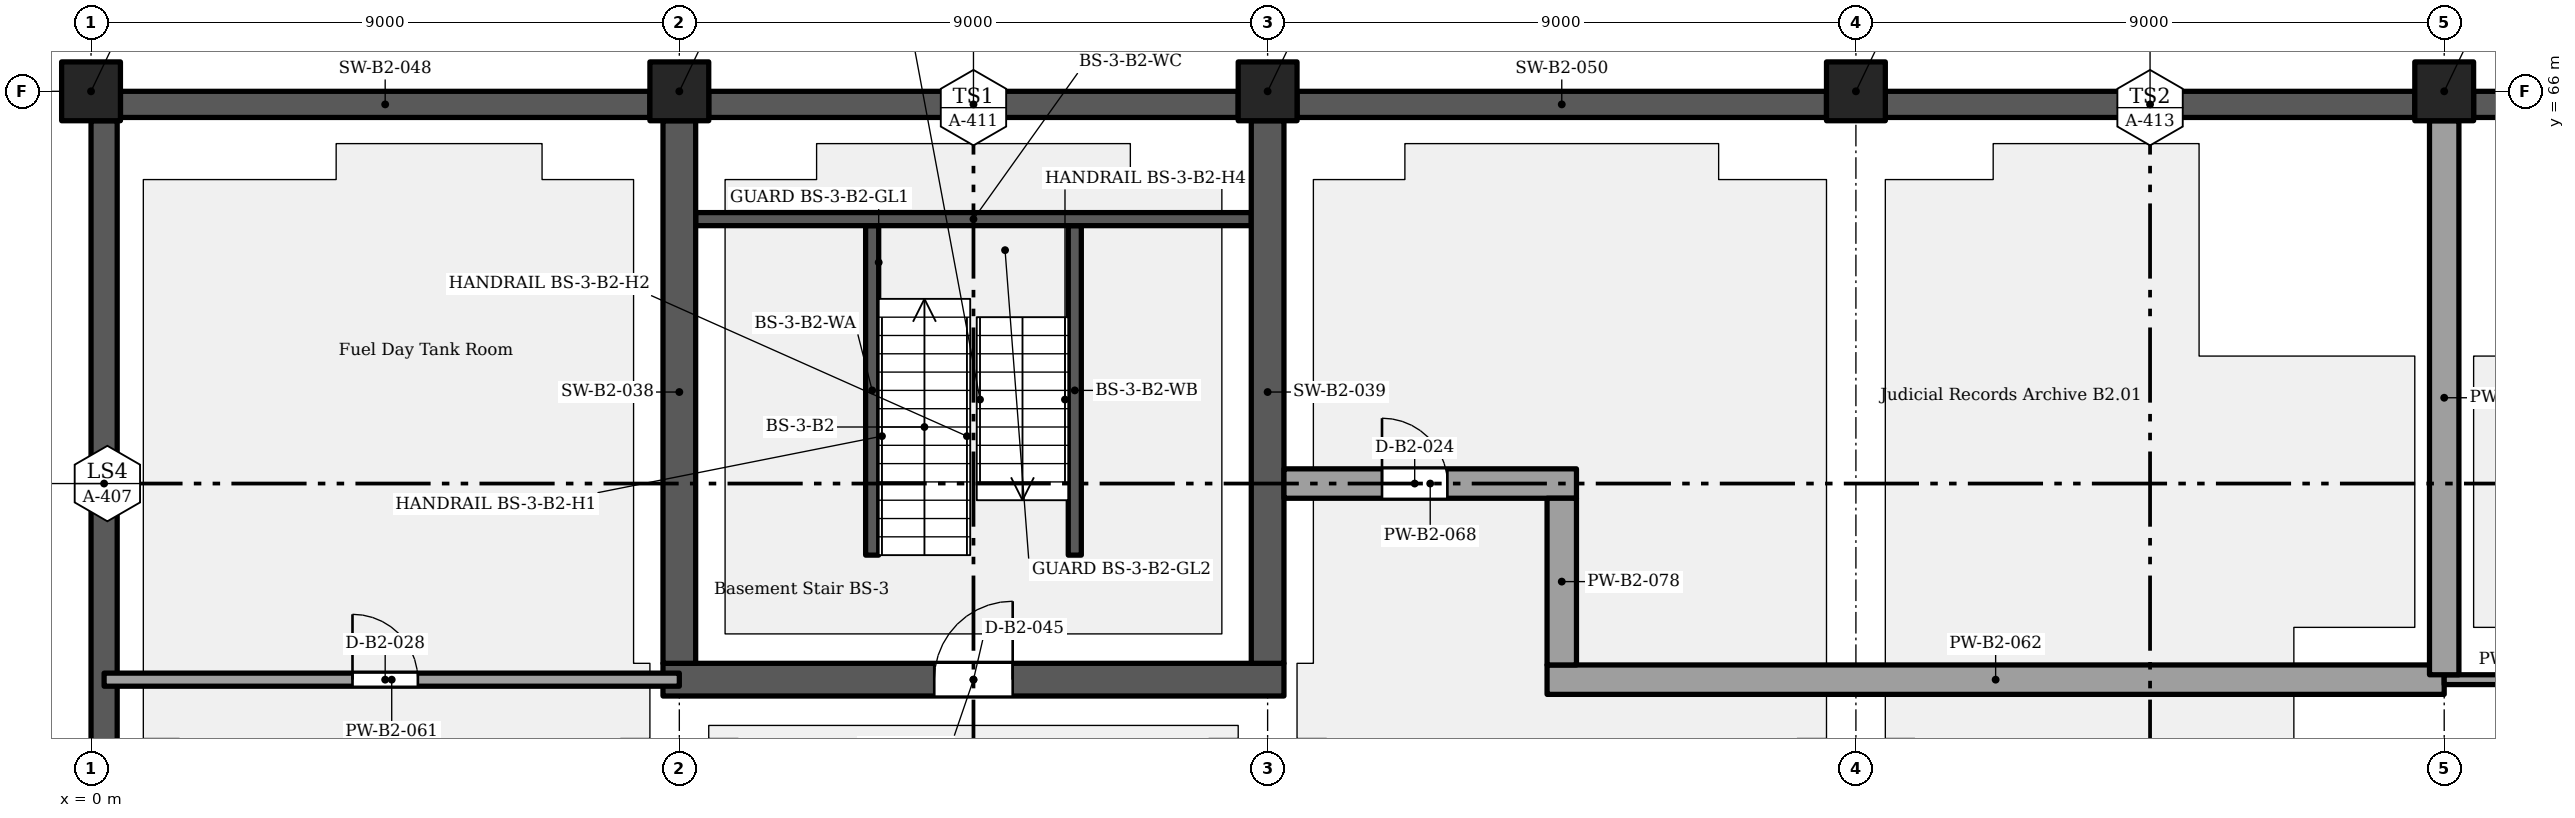
"""IFC4 building model, lengths in metres.
Left out: names, types, materials, properties, quantities, classifications, styles, units other than length and angle.
Written with IfcOpenShell. Run it as: python <this file> out.ifc"""

import sys

from ifc_helpers import new_model, si_unit, direction, frame, frame_2d, origin, origin_2d, place, context, subcontext, project, spatial, rectangle, extrude, element, fill, save


model = new_model("IFC4")
c1 = context("Model", 3, precision=1e-05, world=origin(), true_north=direction((0.0, 1.0)))
c2 = subcontext(c1, "Body", "Model", "MODEL_VIEW")
j1 = project(units=[si_unit("LENGTHUNIT", "METRE"), si_unit("PLANEANGLEUNIT", "RADIAN")], contexts=[c1])
p1 = place(None, origin())
s1 = spatial("IfcSite", under=j1, at=p1, CompositionType="ELEMENT")
p2 = place(p1, origin())
s2 = spatial("IfcBuilding", under=s1, at=p2, CompositionType="ELEMENT")
p3 = place(p2, frame((0.0, 0.0, -8.4)))
s3 = spatial("IfcBuildingStorey", under=s2, at=p3, CompositionType="ELEMENT", Elevation=-8.4)
for number, where, z_axis, x_axis in (
    (1, (0.0, 66.0, 0.0), (0.0, 0.0, 1.0), (1.0, 0.0, 0.0)),
    (2, (9.0, 66.0, 0.0), (0.0, 0.0, 1.0), (1.0, 0.0, 0.0)),
    (3, (18.0, 66.0, 0.0), (0.0, 0.0, 1.0), (1.0, 0.0, 0.0)),
    (4, (27.0, 66.0, 0.0), (0.0, 0.0, 1.0), (1.0, 0.0, 0.0)),
    (5, (36.0, 66.0, 0.0), (0.0, 0.0, 1.0), (1.0, 0.0, 0.0)),
):
    element("IfcColumn", number, at=place(p3, frame(where, z_axis=z_axis, x_axis=x_axis)), inside=s3, PredefinedType="COLUMN", context=c2, shape_type="SweptSolid", body=[
        extrude(rectangle(XDim=0.9, YDim=0.9, at=origin_2d()), origin(), (0.0, 0.0, 1.0), 4.2),
    ])
p4 = place(p3, frame((0.2, 54.45, 0.0), z_axis=(0.0, 0.0, 1.0), x_axis=(0.0, 1.0, 0.0)))
e6 = element("IfcWall", 6, at=p4, inside=s3, PredefinedType="SOLIDWALL", context=c2, shape_type="SweptSolid", body=[
    extrude(rectangle(XDim=11.1, YDim=0.4, at=frame_2d((5.55, 0.0))), origin(), (0.0, 0.0, 1.0), 3.8),
])
p5 = place(p3, frame((8.75, 57.0, 0.0), z_axis=(0.0, 0.0, 1.0), x_axis=(1.0, 0.0, 0.0)))
e7 = element("IfcWall", 7, at=p5, inside=s3, PredefinedType="SHEAR", context=c2, shape_type="SweptSolid", body=[
    extrude(rectangle(XDim=9.5, YDim=0.5, at=frame_2d((4.75, 0.0))), origin(), (0.0, 0.0, 1.0), 3.8),
])
p6 = place(p5, frame((4.15, 0.0, 0.0)))
e8 = element("IfcOpeningElement", 8, at=p6, cuts=e7, PredefinedType="OPENING", context=c2, shape_type="SweptSolid", body=[
    extrude(rectangle(XDim=1.2, YDim=2.1, at=frame_2d((0.6, 1.05))), frame((0.0, 0.26, 0.0), z_axis=(0.0, -1.0, 0.0), x_axis=(1.0, 0.0, 0.0)), (0.0, 0.0, 1.0), 0.52),
])
for number, where, z_axis, x_axis in (
    (9, (9.0, 57.25, 0.0), (0.0, 0.0, 1.0), (0.0, 1.0, 0.0)),
    (10, (18.0, 57.25, 0.0), (0.0, 0.0, 1.0), (0.0, 1.0, 0.0)),
):
    element("IfcWall", number, at=place(p3, frame(where, z_axis=z_axis, x_axis=x_axis)), inside=s3, PredefinedType="SHEAR", context=c2, shape_type="SweptSolid", body=[
        extrude(rectangle(XDim=8.3, YDim=0.5, at=frame_2d((4.15, 0.0))), origin(), (0.0, 0.0, 1.0), 3.8),
    ])
for number, where, z_axis, x_axis in (
    (11, (0.45, 65.8, 0.0), (0.0, 0.0, 1.0), (1.0, 0.0, 0.0)),
    (12, (9.45, 65.8, 0.0), (0.0, 0.0, 1.0), (1.0, 0.0, 0.0)),
    (13, (18.45, 65.8, 0.0), (0.0, 0.0, 1.0), (1.0, 0.0, 0.0)),
    (14, (27.45, 65.8, 0.0), (0.0, 0.0, 1.0), (1.0, 0.0, 0.0)),
    (15, (36.45, 65.8, 0.0), (0.0, 0.0, 1.0), (1.0, 0.0, 0.0)),
):
    element("IfcWall", number, at=place(p3, frame(where, z_axis=z_axis, x_axis=x_axis)), inside=s3, PredefinedType="SOLIDWALL", context=c2, shape_type="SweptSolid", body=[
        extrude(rectangle(XDim=8.1, YDim=0.4, at=frame_2d((4.05, 0.0))), origin(), (0.0, 0.0, 1.0), 3.8),
    ])
p7 = place(p3, frame((0.2, 57.0, 0.0), z_axis=(0.0, 0.0, 1.0), x_axis=(1.0, 0.0, 0.0)))
e16 = element("IfcWall", 16, at=p7, inside=s3, PredefinedType="PARTITIONING", context=c2, shape_type="SweptSolid", body=[
    extrude(rectangle(XDim=8.8, YDim=0.2, at=frame_2d((4.4, 0.0))), origin(), (0.0, 0.0, 1.0), 3.8),
])
p8 = place(p7, frame((3.8, 0.0, 0.0)))
e17 = element("IfcOpeningElement", 17, at=p8, cuts=e16, PredefinedType="OPENING", context=c2, shape_type="SweptSolid", body=[
    extrude(rectangle(XDim=1.0, YDim=2.1, at=frame_2d((0.5, 1.05))), frame((0.0, 0.11, 0.0), z_axis=(0.0, -1.0, 0.0), x_axis=(1.0, 0.0, 0.0)), (0.0, 0.0, 1.0), 0.22),
])
p9 = place(p3, frame((22.275, 57.0, 0.0), z_axis=(0.0, 0.0, 1.0), x_axis=(1.0, 0.0, 0.0)))
e18 = element("IfcWall", 18, at=p9, inside=s3, PredefinedType="PARTITIONING", context=c2, shape_type="SweptSolid", body=[
    extrude(rectangle(XDim=13.725, YDim=0.45, at=frame_2d((6.863, 0.0))), origin(), (0.0, 0.0, 1.0), 3.8),
])
p10 = place(p3, frame((36.0, 57.0, 0.0), z_axis=(0.0, 0.0, 1.0), x_axis=(1.0, 0.0, 0.0)))
e19 = element("IfcWall", 19, at=p10, inside=s3, PredefinedType="PARTITIONING", context=c2, shape_type="SweptSolid", body=[
    extrude(rectangle(XDim=2.475, YDim=0.15, at=frame_2d((1.238, 0.0))), origin(), (0.0, 0.0, 1.0), 3.1),
])
p11 = place(p3, frame((18.25, 60.0, 0.0), z_axis=(0.0, 0.0, 1.0), x_axis=(1.0, 0.0, 0.0)))
e20 = element("IfcWall", 20, at=p11, inside=s3, PredefinedType="PARTITIONING", context=c2, shape_type="SweptSolid", body=[
    extrude(rectangle(XDim=4.475, YDim=0.45, at=frame_2d((2.238, 0.0))), origin(), (0.0, 0.0, 1.0), 3.3),
])
p12 = place(p11, frame((1.5, 0.0, 0.0)))
e21 = element("IfcOpeningElement", 21, at=p12, cuts=e20, PredefinedType="OPENING", context=c2, shape_type="SweptSolid", body=[
    extrude(rectangle(XDim=1.0, YDim=2.1, at=frame_2d((0.5, 1.05))), frame((0.0, 0.235, 0.0), z_axis=(0.0, -1.0, 0.0), x_axis=(1.0, 0.0, 0.0)), (0.0, 0.0, 1.0), 0.47),
])
p13 = place(p3, frame((22.5, 57.225, 0.0), z_axis=(0.0, 0.0, 1.0), x_axis=(0.0, 1.0, 0.0)))
e22 = element("IfcWall", 22, at=p13, inside=s3, PredefinedType="PARTITIONING", context=c2, shape_type="SweptSolid", body=[
    extrude(rectangle(XDim=2.55, YDim=0.45, at=frame_2d((1.275, 0.0))), origin(), (0.0, 0.0, 1.0), 3.05),
])
p14 = place(p3, frame((36.0, 57.075, 0.0), z_axis=(0.0, 0.0, 1.0), x_axis=(0.0, 1.0, 0.0)))
e23 = element("IfcWall", 23, at=p14, inside=s3, PredefinedType="PARTITIONING", context=c2, shape_type="SweptSolid", body=[
    extrude(rectangle(XDim=8.475, YDim=0.45, at=frame_2d((4.238, 0.0))), origin(), (0.0, 0.0, 1.0), 3.05),
])
for number, where, z_axis, x_axis in (
    (24, (11.95, 58.905, 0.0), (0.0, 0.0, 1.0), (0.0, 1.0, 0.0)),
    (25, (15.05, 58.905, 0.0), (0.0, 0.0, 1.0), (0.0, 1.0, 0.0)),
):
    element("IfcWall", number, at=place(p3, frame(where, z_axis=z_axis, x_axis=x_axis)), inside=s3, PredefinedType="SHEAR", context=c2, shape_type="SweptSolid", body=[
        extrude(rectangle(XDim=5.04, YDim=0.2, at=frame_2d((2.52, 0.0))), origin(), (0.0, 0.0, 1.0), 3.8),
    ])
p15 = place(p3, frame((9.25, 64.045, 0.0), z_axis=(0.0, 0.0, 1.0), x_axis=(1.0, 0.0, 0.0)))
e26 = element("IfcWall", 26, at=p15, inside=s3, PredefinedType="SHEAR", context=c2, shape_type="SweptSolid", body=[
    extrude(rectangle(XDim=8.5, YDim=0.2, at=frame_2d((4.25, 0.0))), origin(), (0.0, 0.0, 1.0), 3.8),
])
p16 = place(p12, origin())
e27 = element("IfcDoor", 27, at=p16, inside=s3, OperationType="SINGLE_SWING_LEFT", PredefinedType="DOOR", context=c2, shape_type="SweptSolid", body=[
    extrude(rectangle(XDim=1.0, YDim=2.1, at=frame_2d((0.5, 1.05))), frame((0.0, 0.025, 0.0), z_axis=(0.0, -1.0, 0.0), x_axis=(1.0, 0.0, 0.0)), (0.0, 0.0, 1.0), 0.05),
])
fill(e21, e27)
p17 = place(p8, origin())
e28 = element("IfcDoor", 28, at=p17, inside=s3, OperationType="SINGLE_SWING_LEFT", PredefinedType="DOOR", context=c2, shape_type="SweptSolid", body=[
    extrude(rectangle(XDim=1.0, YDim=2.1, at=frame_2d((0.5, 1.05))), frame((0.0, 0.025, 0.0), z_axis=(0.0, -1.0, 0.0), x_axis=(1.0, 0.0, 0.0)), (0.0, 0.0, 1.0), 0.05),
])
fill(e17, e28)
p18 = place(p6, origin())
e29 = element("IfcDoor", 29, at=p18, inside=s3, OperationType="SINGLE_SWING_RIGHT", PredefinedType="DOOR", context=c2, shape_type="SweptSolid", body=[
    extrude(rectangle(XDim=1.2, YDim=2.1, at=frame_2d((0.6, 1.05))), frame((0.0, 0.025, 0.0), z_axis=(0.0, -1.0, 0.0), x_axis=(1.0, 0.0, 0.0)), (0.0, 0.0, 1.0), 0.05),
])
fill(e8, e29)
save(model, sys.argv[1])
